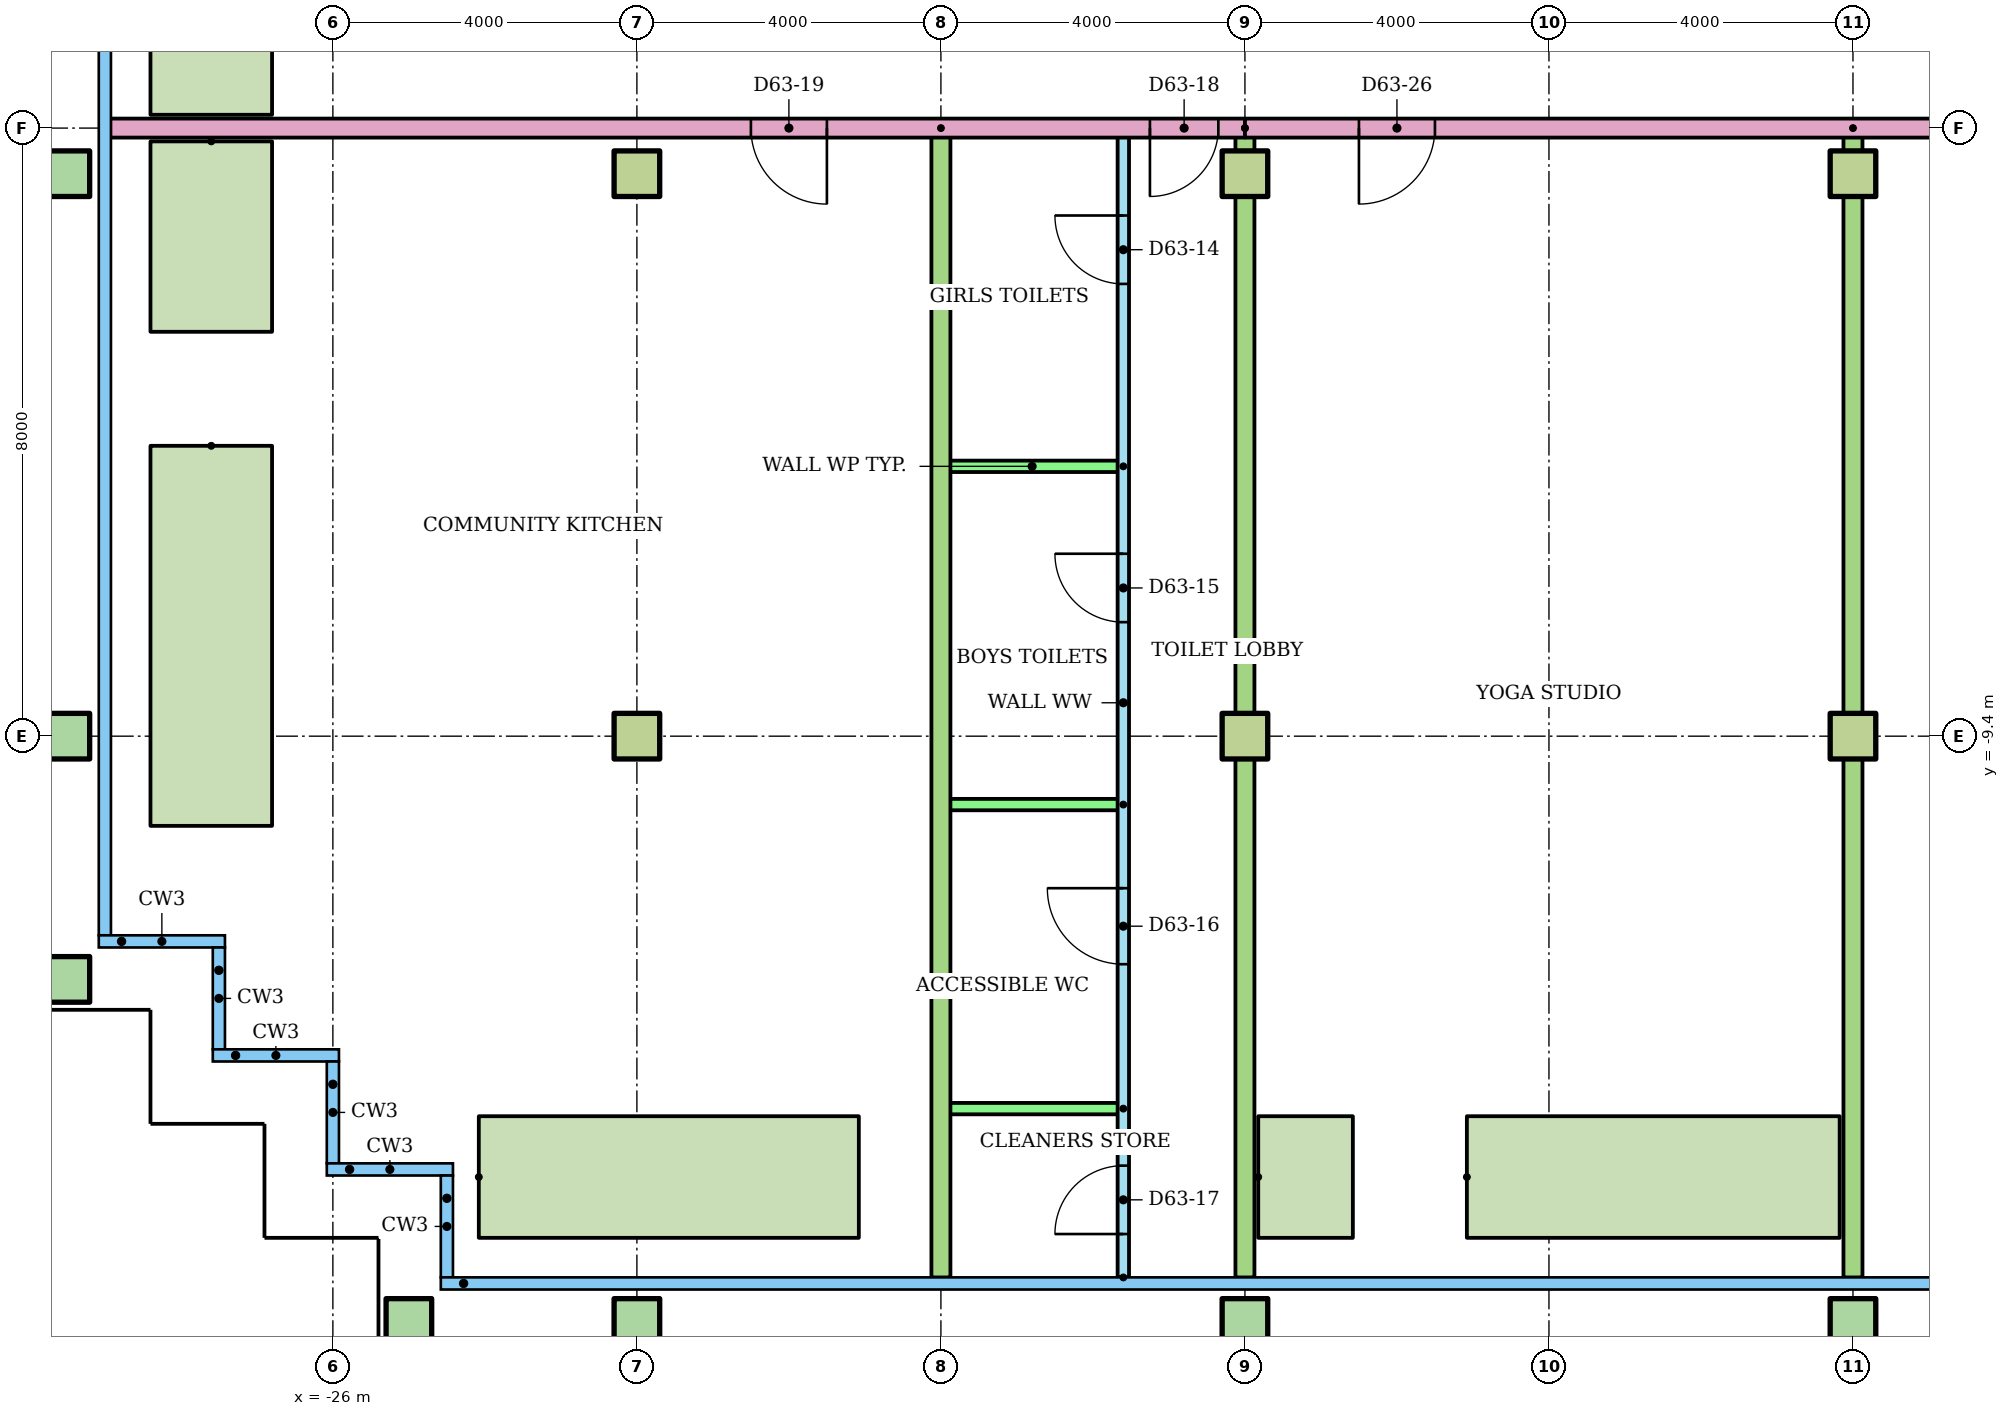
"""IFC4 building model, lengths in metres.
Left out: names, types, materials, properties, quantities, classifications, styles, units other than length and angle.
Written with IfcOpenShell. Run it as: python <this file> out.ifc"""

import sys

from ifc_helpers import new_model, si_unit, direction, frame, frame_2d, origin, origin_2d, place, context, subcontext, project, spatial, rectangle, hollow_rectangle, extrude, element, fill, save


model = new_model("IFC4")
c1 = context("Model", 3, precision=1e-05, world=origin(), true_north=direction((0.0, 1.0)))
c2 = subcontext(c1, "Body", "Model", "MODEL_VIEW")
j1 = project(units=[si_unit("LENGTHUNIT", "METRE"), si_unit("PLANEANGLEUNIT", "RADIAN")], contexts=[c1])
p1 = place(None, origin())
s1 = spatial("IfcSite", under=j1, at=p1, CompositionType="ELEMENT")
p2 = place(p1, origin())
s2 = spatial("IfcBuilding", under=s1, at=p2, CompositionType="ELEMENT")
p3 = place(p2, frame((0.0, 0.0, 239.6)))
s3 = spatial("IfcBuildingStorey", under=s2, at=p3, CompositionType="ELEMENT", Elevation=239.6)
for number, where in (
    (1, (-25.0, -17.1, 0.0)),
    (2, (-22.0, -17.1, 0.0)),
    (3, (-14.0, -17.1, 0.0)),
    (4, (-6.0, -17.1, 0.0)),
    (5, (-29.5, -12.6, 0.0)),
    (6, (-29.5, -9.4, 0.0)),
):
    element("IfcColumn", number, at=place(p3, frame(where)), inside=s3, PredefinedType="COLUMN", context=c2, shape_type="SweptSolid", body=[
        extrude(hollow_rectangle(XDim=0.6, YDim=0.6, WallThickness=0.03, at=origin_2d()), origin(), (0.0, 0.0, 1.0), 9.25),
    ])
for number, where in (
    (7, (-22.0, -9.4, 0.0)),
    (8, (-14.0, -9.4, 0.0)),
    (9, (-6.0, -9.4, 0.0)),
):
    element("IfcColumn", number, at=place(p3, frame(where)), inside=s3, PredefinedType="COLUMN", context=c2, shape_type="SweptSolid", body=[
        extrude(rectangle(XDim=0.6, YDim=0.6, at=origin_2d()), origin(), (0.0, 0.0, 1.0), 8.8),
    ])
p4 = place(p3, frame((-29.5, -2.0, 0.0)))
e10 = element("IfcColumn", 10, at=p4, inside=s3, PredefinedType="COLUMN", context=c2, shape_type="SweptSolid", body=[
    extrude(hollow_rectangle(XDim=0.6, YDim=0.6, WallThickness=0.03, at=origin_2d()), origin(), (0.0, 0.0, 1.0), 9.25),
])
for number, where in (
    (11, (-22.0, -2.0, 0.0)),
    (12, (-14.0, -2.0, 0.0)),
    (13, (-6.0, -2.0, 0.0)),
):
    element("IfcColumn", number, at=place(p3, frame(where)), inside=s3, PredefinedType="COLUMN", context=c2, shape_type="SweptSolid", body=[
        extrude(rectangle(XDim=0.6, YDim=0.6, at=origin_2d()), origin(), (0.0, 0.0, 1.0), 8.8),
    ])
p5 = place(p3, frame((-27.6, -5.58, 0.0), z_axis=(0.0, 0.0, 1.0), x_axis=(0.0, -1.0, 0.0)))
e14 = element("IfcWall", 14, at=p5, inside=s3, PredefinedType="STANDARD", context=c2, shape_type="SweptSolid", body=[
    extrude(rectangle(XDim=5.0, YDim=1.6, at=frame_2d((2.5, 0.0))), origin(), (0.0, 0.0, 1.0), 0.8),
])
p6 = place(p3, frame((-24.08, -15.2, 0.0)))
e15 = element("IfcWall", 15, at=p6, inside=s3, PredefinedType="STANDARD", context=c2, shape_type="SweptSolid", body=[
    extrude(rectangle(XDim=5.0, YDim=1.6, at=frame_2d((2.5, 0.0))), origin(), (0.0, 0.0, 1.0), 0.8),
])
p7 = place(p3, frame((-14.0, -1.4, 0.0), z_axis=(0.0, 0.0, 1.0), x_axis=(-1.0, 0.0, 0.0)))
e16 = element("IfcWall", 16, at=p7, inside=s3, PredefinedType="PARTITIONING", context=c2, shape_type="SweptSolid", body=[
    extrude(rectangle(XDim=14.93, YDim=0.25, at=frame_2d((7.465, 0.0))), origin(), (0.0, 0.0, 1.0), 8.8),
])
p8 = place(p7, frame((0.35, 0.0, 0.0)))
e17 = element("IfcOpeningElement", 17, at=p8, cuts=e16, PredefinedType="OPENING", context=c2, shape_type="SweptSolid", body=[
    extrude(rectangle(XDim=0.9, YDim=2.1, at=frame_2d((0.45, 1.05))), frame((0.0, 0.135, 0.0), z_axis=(0.0, -1.0, 0.0), x_axis=(1.0, 0.0, 0.0)), (0.0, 0.0, 1.0), 0.27),
])
p9 = place(p7, frame((5.5, 0.0, 0.0)))
e18 = element("IfcOpeningElement", 18, at=p9, cuts=e16, PredefinedType="OPENING", context=c2, shape_type="SweptSolid", body=[
    extrude(rectangle(XDim=1.0, YDim=2.1, at=frame_2d((0.5, 1.05))), frame((0.0, 0.135, 0.0), z_axis=(0.0, -1.0, 0.0), x_axis=(1.0, 0.0, 0.0)), (0.0, 0.0, 1.0), 0.27),
])
p10 = place(p3, frame((-15.6, -16.521, 0.0), z_axis=(0.0, 0.0, 1.0), x_axis=(0.0, 1.0, 0.0)))
e19 = element("IfcWall", 19, at=p10, inside=s3, PredefinedType="PARTITIONING", context=c2, shape_type="SweptSolid", body=[
    extrude(rectangle(XDim=15.121, YDim=0.15, at=frame_2d((7.561, 0.0))), origin(), (0.0, 0.0, 1.0), 8.8),
])
p11 = place(p10, frame((13.071, 0.0, 0.0)))
e20 = element("IfcOpeningElement", 20, at=p11, cuts=e19, PredefinedType="OPENING", context=c2, shape_type="SweptSolid", body=[
    extrude(rectangle(XDim=0.9, YDim=2.1, at=frame_2d((0.45, 1.05))), frame((0.0, 0.085, 0.0), z_axis=(0.0, -1.0, 0.0), x_axis=(1.0, 0.0, 0.0)), (0.0, 0.0, 1.0), 0.17),
])
p12 = place(p10, frame((8.621, 0.0, 0.0)))
e21 = element("IfcOpeningElement", 21, at=p12, cuts=e19, PredefinedType="OPENING", context=c2, shape_type="SweptSolid", body=[
    extrude(rectangle(XDim=0.9, YDim=2.1, at=frame_2d((0.45, 1.05))), frame((0.0, 0.085, 0.0), z_axis=(0.0, -1.0, 0.0), x_axis=(1.0, 0.0, 0.0)), (0.0, 0.0, 1.0), 0.17),
])
p13 = place(p10, frame((4.121, 0.0, 0.0)))
e22 = element("IfcOpeningElement", 22, at=p13, cuts=e19, PredefinedType="OPENING", context=c2, shape_type="SweptSolid", body=[
    extrude(rectangle(XDim=1.0, YDim=2.1, at=frame_2d((0.5, 1.05))), frame((0.0, 0.085, 0.0), z_axis=(0.0, -1.0, 0.0), x_axis=(1.0, 0.0, 0.0)), (0.0, 0.0, 1.0), 0.17),
])
p14 = place(p10, frame((0.571, 0.0, 0.0)))
e23 = element("IfcOpeningElement", 23, at=p14, cuts=e19, PredefinedType="OPENING", context=c2, shape_type="SweptSolid", body=[
    extrude(rectangle(XDim=0.9, YDim=2.1, at=frame_2d((0.45, 1.05))), frame((0.0, 0.085, 0.0), z_axis=(0.0, -1.0, 0.0), x_axis=(1.0, 0.0, 0.0)), (0.0, 0.0, 1.0), 0.17),
])
for number, where, z_axis, x_axis in (
    (24, (-15.6, -5.85, 0.0), (0.0, 0.0, 1.0), (-1.0, 0.0, 0.0)),
    (25, (-15.6, -10.3, 0.0), (0.0, 0.0, 1.0), (-1.0, 0.0, 0.0)),
    (26, (-15.6, -14.3, 0.0), (0.0, 0.0, 1.0), (-1.0, 0.0, 0.0)),
):
    element("IfcWall", number, at=place(p3, frame(where, z_axis=z_axis, x_axis=x_axis)), inside=s3, PredefinedType="PARTITIONING", context=c2, shape_type="SweptSolid", body=[
        extrude(rectangle(XDim=2.4, YDim=0.15, at=frame_2d((1.2, 0.0))), origin(), (0.0, 0.0, 1.0), 8.8),
    ])
for number, where, z_axis, x_axis in (
    (27, (-18.0, -1.4, 0.0), (0.0, 0.0, 1.0), (0.0, -1.0, 0.0)),
    (28, (-14.0, -1.4, 0.0), (0.0, 0.0, 1.0), (0.0, -1.0, 0.0)),
    (29, (-6.0, -1.4, 0.0), (0.0, 0.0, 1.0), (0.0, -1.0, 0.0)),
):
    element("IfcWall", number, at=place(p3, frame(where, z_axis=z_axis, x_axis=x_axis)), inside=s3, PredefinedType="PARTITIONING", context=c2, shape_type="SweptSolid", body=[
        extrude(rectangle(XDim=15.121, YDim=0.25, at=frame_2d((7.561, 0.0))), origin(), (0.0, 0.0, 1.0), 8.8),
    ])
p15 = place(p3, frame((14.0, -1.4, 0.0), z_axis=(0.0, 0.0, 1.0), x_axis=(-1.0, 0.0, 0.0)))
e30 = element("IfcWall", 30, at=p15, inside=s3, PredefinedType="PARTITIONING", context=c2, shape_type="SweptSolid", body=[
    extrude(rectangle(XDim=28.0, YDim=0.25, at=frame_2d((14.0, 0.0))), origin(), (0.0, 0.0, 1.0), 8.8),
])
p16 = place(p15, frame((25.5, 0.0, 0.0)))
e31 = element("IfcOpeningElement", 31, at=p16, cuts=e30, PredefinedType="OPENING", context=c2, shape_type="SweptSolid", body=[
    extrude(rectangle(XDim=1.0, YDim=2.1, at=frame_2d((0.5, 1.05))), frame((0.0, 0.135, 0.0), z_axis=(0.0, -1.0, 0.0), x_axis=(1.0, 0.0, 0.0)), (0.0, 0.0, 1.0), 0.27),
])
p17 = place(p15, frame((17.5, 0.0, 0.0)))
e32 = element("IfcOpeningElement", 32, at=p17, cuts=e30, PredefinedType="OPENING", context=c2, shape_type="SweptSolid", body=[
    extrude(rectangle(XDim=1.0, YDim=2.1, at=frame_2d((0.5, 1.05))), frame((0.0, 0.135, 0.0), z_axis=(0.0, -1.0, 0.0), x_axis=(1.0, 0.0, 0.0)), (0.0, 0.0, 1.0), 0.27),
])
p18 = place(p15, frame((1.5, 0.0, 0.0)))
e33 = element("IfcOpeningElement", 33, at=p18, cuts=e30, PredefinedType="OPENING", context=c2, shape_type="SweptSolid", body=[
    extrude(rectangle(XDim=1.0, YDim=2.1, at=frame_2d((0.5, 1.05))), frame((0.0, 0.135, 0.0), z_axis=(0.0, -1.0, 0.0), x_axis=(1.0, 0.0, 0.0)), (0.0, 0.0, 1.0), 0.27),
])
p19 = place(p3, frame((-27.6, 0.92, 0.0), z_axis=(0.0, 0.0, 1.0), x_axis=(0.0, -1.0, 0.0)))
e34 = element("IfcWall", 34, at=p19, inside=s3, PredefinedType="STANDARD", context=c2, shape_type="SweptSolid", body=[
    extrude(rectangle(XDim=2.145, YDim=1.6, at=frame_2d((1.073, 0.0))), origin(), (0.0, 0.0, 1.0), 0.8),
])
p20 = place(p3, frame((-27.6, -1.575, 0.0), z_axis=(0.0, 0.0, 1.0), x_axis=(0.0, -1.0, 0.0)))
e35 = element("IfcWall", 35, at=p20, inside=s3, PredefinedType="STANDARD", context=c2, shape_type="SweptSolid", body=[
    extrude(rectangle(XDim=2.505, YDim=1.6, at=frame_2d((1.252, 0.0))), origin(), (0.0, 0.0, 1.0), 0.8),
])
p21 = place(p3, frame((-13.825, -15.2, 0.0)))
e36 = element("IfcWall", 36, at=p21, inside=s3, PredefinedType="STANDARD", context=c2, shape_type="SweptSolid", body=[
    extrude(rectangle(XDim=1.245, YDim=1.6, at=frame_2d((0.623, 0.0))), origin(), (0.0, 0.0, 1.0), 0.8),
])
p22 = place(p3, frame((-11.08, -15.2, 0.0)))
e37 = element("IfcWall", 37, at=p22, inside=s3, PredefinedType="STANDARD", context=c2, shape_type="SweptSolid", body=[
    extrude(rectangle(XDim=4.905, YDim=1.6, at=frame_2d((2.453, 0.0))), origin(), (0.0, 0.0, 1.0), 0.8),
])
p23 = place(p11, origin())
e38 = element("IfcDoor", 38, at=p23, inside=s3, OperationType="SINGLE_SWING_RIGHT", PredefinedType="DOOR", context=c2, shape_type="SweptSolid", body=[
    extrude(rectangle(XDim=0.9, YDim=2.1, at=frame_2d((0.45, 1.05))), frame((0.0, 0.025, 0.0), z_axis=(0.0, -1.0, 0.0), x_axis=(1.0, 0.0, 0.0)), (0.0, 0.0, 1.0), 0.05),
])
fill(e20, e38)
p24 = place(p12, origin())
e39 = element("IfcDoor", 39, at=p24, inside=s3, OperationType="SINGLE_SWING_RIGHT", PredefinedType="DOOR", context=c2, shape_type="SweptSolid", body=[
    extrude(rectangle(XDim=0.9, YDim=2.1, at=frame_2d((0.45, 1.05))), frame((0.0, 0.025, 0.0), z_axis=(0.0, -1.0, 0.0), x_axis=(1.0, 0.0, 0.0)), (0.0, 0.0, 1.0), 0.05),
])
fill(e21, e39)
p25 = place(p13, origin())
e40 = element("IfcDoor", 40, at=p25, inside=s3, OperationType="SINGLE_SWING_RIGHT", PredefinedType="DOOR", context=c2, shape_type="SweptSolid", body=[
    extrude(rectangle(XDim=1.0, YDim=2.1, at=frame_2d((0.5, 1.05))), frame((0.0, 0.025, 0.0), z_axis=(0.0, -1.0, 0.0), x_axis=(1.0, 0.0, 0.0)), (0.0, 0.0, 1.0), 0.05),
])
fill(e22, e40)
p26 = place(p14, origin())
e41 = element("IfcDoor", 41, at=p26, inside=s3, OperationType="SINGLE_SWING_LEFT", PredefinedType="DOOR", context=c2, shape_type="SweptSolid", body=[
    extrude(rectangle(XDim=0.9, YDim=2.1, at=frame_2d((0.45, 1.05))), frame((0.0, 0.025, 0.0), z_axis=(0.0, -1.0, 0.0), x_axis=(1.0, 0.0, 0.0)), (0.0, 0.0, 1.0), 0.05),
])
fill(e23, e41)
p27 = place(p8, origin())
e42 = element("IfcDoor", 42, at=p27, inside=s3, OperationType="SINGLE_SWING_RIGHT", PredefinedType="DOOR", context=c2, shape_type="SweptSolid", body=[
    extrude(rectangle(XDim=0.9, YDim=2.1, at=frame_2d((0.45, 1.05))), frame((0.0, 0.025, 0.0), z_axis=(0.0, -1.0, 0.0), x_axis=(1.0, 0.0, 0.0)), (0.0, 0.0, 1.0), 0.05),
])
fill(e17, e42)
p28 = place(p9, origin())
e43 = element("IfcDoor", 43, at=p28, inside=s3, OperationType="SINGLE_SWING_LEFT", PredefinedType="DOOR", context=c2, shape_type="SweptSolid", body=[
    extrude(rectangle(XDim=1.0, YDim=2.1, at=frame_2d((0.5, 1.05))), frame((0.0, 0.025, 0.0), z_axis=(0.0, -1.0, 0.0), x_axis=(1.0, 0.0, 0.0)), (0.0, 0.0, 1.0), 0.05),
])
fill(e18, e43)
p29 = place(p16, origin())
e44 = element("IfcDoor", 44, at=p29, inside=s3, OperationType="SINGLE_SWING_RIGHT", PredefinedType="DOOR", context=c2, shape_type="SweptSolid", body=[
    extrude(rectangle(XDim=1.0, YDim=2.1, at=frame_2d((0.5, 1.05))), frame((0.0, 0.025, 0.0), z_axis=(0.0, -1.0, 0.0), x_axis=(1.0, 0.0, 0.0)), (0.0, 0.0, 1.0), 0.05),
])
fill(e31, e44)
save(model, sys.argv[1])
